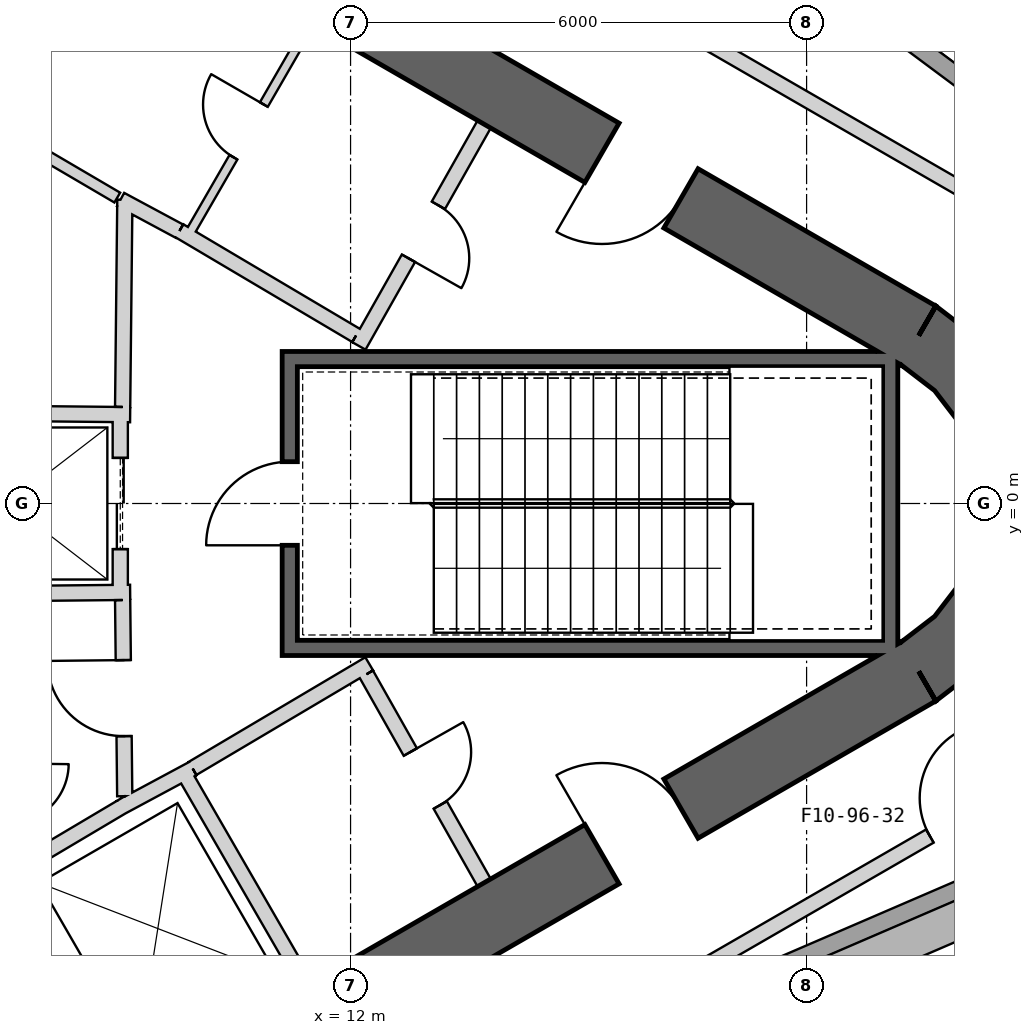
"""IFC4 building model, lengths in metres.
Left out: names, types, materials, properties, quantities, classifications, styles, units other than length and angle.
Written with IfcOpenShell. Run it as: python <this file> out.ifc"""

import sys

from ifc_helpers import new_model, si_unit, direction, frame, frame_2d, origin, place, context, subcontext, project, spatial, polyline, rectangle, outline, extrude, element, fill, save


model = new_model("IFC4")
c1 = context("Model", 3, precision=1e-05, world=origin(), true_north=direction((0.0, 1.0)))
c2 = subcontext(c1, "Body", "Model", "MODEL_VIEW")
j1 = project(units=[si_unit("LENGTHUNIT", "METRE"), si_unit("PLANEANGLEUNIT", "RADIAN")], contexts=[c1])
p1 = place(None, origin())
s1 = spatial("IfcSite", under=j1, at=p1, CompositionType="ELEMENT")
p2 = place(p1, origin())
s2 = spatial("IfcBuilding", under=s1, at=p2, CompositionType="ELEMENT")
p3 = place(p2, frame((0.0, 0.0, 425.3)))
s3 = spatial("IfcBuildingStorey", under=s2, at=p3, CompositionType="ELEMENT", Elevation=425.3)
p4 = place(p3, frame((19.475, 2.208, 0.0), z_axis=(0.0, 0.0, 1.0), x_axis=(-0.866028369851, 0.499994862586, 0.0)))
e1 = element("IfcWall", 1, at=p4, inside=s3, PredefinedType="SHEAR", context=c2, shape_type="SweptSolid", body=[
    extrude(rectangle(XDim=31.523, YDim=0.9, at=frame_2d((15.762, 0.0))), origin(), (0.0, 0.0, 1.0), 5.0),
])
p5 = place(p4, frame((3.612, 0.0, 0.0)))
e2 = element("IfcOpeningElement", 2, at=p5, cuts=e1, PredefinedType="OPENING", context=c2, shape_type="SweptSolid", body=[
    extrude(rectangle(XDim=1.2, YDim=2.4, at=frame_2d((0.6, 1.2))), frame((0.0, 0.46, 0.0), z_axis=(0.0, -1.0, 0.0), x_axis=(1.0, 0.0, 0.0)), (0.0, 0.0, 1.0), 0.92),
])
p6 = place(p4, frame((26.712, 0.0, 0.0)))
e3 = element("IfcOpeningElement", 3, at=p6, cuts=e1, PredefinedType="OPENING", context=c2, shape_type="SweptSolid", body=[
    extrude(rectangle(XDim=1.2, YDim=2.4, at=frame_2d((0.6, 1.2))), frame((0.0, 0.46, 0.0), z_axis=(0.0, -1.0, 0.0), x_axis=(1.0, 0.0, 0.0)), (0.0, 0.0, 1.0), 0.92),
])
p7 = place(p3, frame((-7.825, -17.97, 0.0), z_axis=(0.0, 0.0, 1.0), x_axis=(0.866028369851, 0.499994862586, 0.0)))
e4 = element("IfcWall", 4, at=p7, inside=s3, PredefinedType="SHEAR", context=c2, shape_type="SweptSolid", body=[
    extrude(rectangle(XDim=31.523, YDim=0.9, at=frame_2d((15.762, 0.0))), origin(), (0.0, 0.0, 1.0), 5.0),
])
p8 = place(p7, frame((17.862, 0.0, 0.0)))
e5 = element("IfcOpeningElement", 5, at=p8, cuts=e4, PredefinedType="OPENING", context=c2, shape_type="SweptSolid", body=[
    extrude(rectangle(XDim=1.2, YDim=2.4, at=frame_2d((0.6, 1.2))), frame((0.0, 0.46, 0.0), z_axis=(0.0, -1.0, 0.0), x_axis=(1.0, 0.0, 0.0)), (0.0, 0.0, 1.0), 0.92),
])
p9 = place(p7, frame((20.562, 0.0, 0.0)))
e6 = element("IfcOpeningElement", 6, at=p9, cuts=e4, PredefinedType="OPENING", context=c2, shape_type="SweptSolid", body=[
    extrude(rectangle(XDim=1.2, YDim=2.4, at=frame_2d((0.6, 1.2))), frame((0.0, 0.46, 0.0), z_axis=(0.0, -1.0, 0.0), x_axis=(1.0, 0.0, 0.0)), (0.0, 0.0, 1.0), 0.92),
])
p10 = place(p7, frame((26.712, 0.0, 0.0)))
e7 = element("IfcOpeningElement", 7, at=p10, cuts=e4, PredefinedType="OPENING", context=c2, shape_type="SweptSolid", body=[
    extrude(rectangle(XDim=1.2, YDim=2.4, at=frame_2d((0.6, 1.2))), frame((0.0, 0.46, 0.0), z_axis=(0.0, -1.0, 0.0), x_axis=(1.0, 0.0, 0.0)), (0.0, 0.0, 1.0), 0.92),
])
p11 = place(p7, frame((3.612, 0.0, 0.0)))
e8 = element("IfcOpeningElement", 8, at=p11, cuts=e4, PredefinedType="OPENING", context=c2, shape_type="SweptSolid", body=[
    extrude(rectangle(XDim=1.2, YDim=2.4, at=frame_2d((0.6, 1.2))), frame((0.0, 0.46, 0.0), z_axis=(0.0, -1.0, 0.0), x_axis=(1.0, 0.0, 0.0)), (0.0, 0.0, 1.0), 0.92),
])
p12 = place(p3, origin())
e9 = element("IfcWall", 9, at=p12, inside=s3, PredefinedType="SHEAR", context=c2, shape_type="SweptSolid", body=[
    extrude(outline(polyline([(19.7, -2.598), (20.321, -2.121), (20.798, -1.5), (21.098, -0.777), (21.2, 0.0), (21.098, 0.777), (20.798, 1.5), (20.321, 2.121), (19.7, 2.598), (19.25, 1.819), (19.685, 1.485), (20.019, 1.05), (20.229, 0.543), (20.3, 0.0), (20.229, -0.543), (20.019, -1.05), (19.685, -1.485), (19.25, -1.819), (19.7, -2.598)])), origin(), (0.0, 0.0, 1.0), 5.0),
])
p13 = place(p3, frame((21.654, 4.375, 0.0), z_axis=(0.0, 0.0, 1.0), x_axis=(-0.802005747834, 0.597316315231, 0.0)))
e10 = element("IfcWall", 10, at=p13, inside=s3, PredefinedType="SOLIDWALL", context=c2, shape_type="SweptSolid", body=[
    extrude(rectangle(XDim=6.66, YDim=0.24, at=frame_2d((3.33, 0.0))), origin(), (0.0, 0.0, 1.0), 4.75),
])
p14 = place(p3, frame((15.54, -7.005, 0.0), z_axis=(0.0, 0.0, 1.0), x_axis=(0.918309861651, 0.395862347281, 0.0)))
e11 = element("IfcWall", 11, at=p14, inside=s3, PredefinedType="SOLIDWALL", context=c2, shape_type="SweptSolid", body=[
    extrude(rectangle(XDim=6.669, YDim=0.24, at=frame_2d((3.335, 0.0))), origin(), (0.0, 0.0, 1.0), 4.75),
])
p15 = place(p3, frame((23.637, -4.509, 0.04), z_axis=(0.0, 0.0, 1.0), x_axis=(-0.918296120804, -0.395894221372, 0.0)))
e12 = element("IfcWall", 12, at=p15, inside=s3, PredefinedType="PARAPET", context=c2, shape_type="SweptSolid", body=[
    extrude(rectangle(XDim=7.277, YDim=0.25, at=frame_2d((3.639, 0.0))), origin(), (0.0, 0.0, 1.0), 1.2),
])
p16 = place(p3, frame((17.792, 8.88, 0.04), z_axis=(0.0, 0.0, 1.0), x_axis=(0.801990625962, -0.597336618557, 0.0)))
e13 = element("IfcWall", 13, at=p16, inside=s3, PredefinedType="PARAPET", context=c2, shape_type="SweptSolid", body=[
    extrude(rectangle(XDim=7.254, YDim=0.25, at=frame_2d((3.627, 0.0))), origin(), (0.0, 0.0, 1.0), 1.2),
])
p17 = place(p3, frame((22.794, -4.273, 0.04), z_axis=(0.0, 0.0, 1.0), x_axis=(-0.918301368911, -0.395882047908, 0.0)))
e14 = element("IfcWall", 14, at=p17, inside=s3, PredefinedType="PARAPET", context=c2, shape_type="SweptSolid", body=[
    extrude(rectangle(XDim=6.062, YDim=0.5, at=frame_2d((3.031, 0.0))), origin(), (0.0, 0.0, 1.0), 0.6),
])
p18 = place(p3, frame((17.978, 8.056, 0.04), z_axis=(0.0, 0.0, 1.0), x_axis=(0.801984037466, -0.597345464242, 0.0)))
e15 = element("IfcWall", 15, at=p18, inside=s3, PredefinedType="PARAPET", context=c2, shape_type="SweptSolid", body=[
    extrude(rectangle(XDim=5.982, YDim=0.5, at=frame_2d((2.991, 0.0))), origin(), (0.0, 0.0, 1.0), 0.6),
])
p19 = place(p3, frame((9.795, -3.525, 0.0), z_axis=(0.0, 0.0, 1.0), x_axis=(0.499984717929, -0.866034226713, 0.0)))
e16 = element("IfcWall", 16, at=p19, inside=s3, PredefinedType="PLUMBINGWALL", context=c2, shape_type="SweptSolid", body=[
    extrude(rectangle(XDim=3.25, YDim=0.2, at=frame_2d((1.625, 0.0))), origin(), (0.0, 0.0, 1.0), 4.75),
])
p20 = place(p3, frame((8.974, -3.999, 0.0), z_axis=(0.0, 0.0, 1.0), x_axis=(0.880907015104, 0.473289373154, 0.0)))
e17 = element("IfcWall", 17, at=p20, inside=s3, PredefinedType="PLUMBINGWALL", context=c2, shape_type="SweptSolid", body=[
    extrude(rectangle(XDim=1.078, YDim=0.2, at=frame_2d((0.539, 0.0))), origin(), (0.0, 0.0, 1.0), 4.75),
])
p21 = place(p3, frame((7.493, -4.878, 0.0), z_axis=(0.0, 0.0, 1.0), x_axis=(0.859981807212, 0.510324691999, 0.0)))
e18 = element("IfcWall", 18, at=p21, inside=s3, PredefinedType="PLUMBINGWALL", context=c2, shape_type="SweptSolid", body=[
    extrude(rectangle(XDim=1.845, YDim=0.2, at=frame_2d((0.922, 0.0))), origin(), (0.0, 0.0, 1.0), 4.75),
])
p22 = place(p3, frame((19.2, 1.9, -0.25), z_axis=(0.0, 0.0, 1.0), x_axis=(-1.0, 0.0, 0.0)))
e19 = element("IfcWall", 19, at=p22, inside=s3, PredefinedType="SHEAR", context=c2, shape_type="SweptSolid", body=[
    extrude(rectangle(XDim=8.1, YDim=0.2, at=frame_2d((4.05, 0.0))), origin(), (0.0, 0.0, 1.0), 5.0),
])
p23 = place(p3, frame((19.1, -2.0, -0.25), z_axis=(0.0, 0.0, 1.0), x_axis=(0.0, 1.0, 0.0)))
e20 = element("IfcWall", 20, at=p23, inside=s3, PredefinedType="SHEAR", context=c2, shape_type="SweptSolid", body=[
    extrude(rectangle(XDim=3.8, YDim=0.2, at=frame_2d((1.9, 0.0))), origin(), (0.0, 0.0, 1.0), 5.0),
])
p24 = place(p3, frame((11.1, -1.9, -0.25), z_axis=(0.0, 0.0, 1.0), x_axis=(1.0, 0.0, 0.0)))
e21 = element("IfcWall", 21, at=p24, inside=s3, PredefinedType="SHEAR", context=c2, shape_type="SweptSolid", body=[
    extrude(rectangle(XDim=7.9, YDim=0.2, at=frame_2d((3.95, 0.0))), origin(), (0.0, 0.0, 1.0), 5.0),
])
p25 = place(p3, frame((11.2, -1.8, -0.25), z_axis=(0.0, 0.0, 1.0), x_axis=(0.0, 1.0, 0.0)))
e22 = element("IfcWall", 22, at=p25, inside=s3, PredefinedType="SHEAR", context=c2, shape_type="SweptSolid", body=[
    extrude(rectangle(XDim=3.6, YDim=0.2, at=frame_2d((1.8, 0.0))), origin(), (0.0, 0.0, 1.0), 5.0),
])
p26 = place(p25, frame((1.25, 0.0, 0.25)))
e23 = element("IfcOpeningElement", 23, at=p26, cuts=e22, PredefinedType="OPENING", context=c2, shape_type="SweptSolid", body=[
    extrude(rectangle(XDim=1.1, YDim=2.1, at=frame_2d((0.55, 1.05))), frame((0.0, 0.11, 0.0), z_axis=(0.0, -1.0, 0.0), x_axis=(1.0, 0.0, 0.0)), (0.0, 0.0, 1.0), 0.22),
])
p27 = place(p3, frame((8.97, 1.2, 0.0), z_axis=(0.0, 0.0, 1.0), x_axis=(0.0, -1.0, 0.0)))
e24 = element("IfcWall", 24, at=p27, inside=s3, PredefinedType="PLUMBINGWALL", context=c2, shape_type="SweptSolid", body=[
    extrude(rectangle(XDim=2.4, YDim=0.2, at=frame_2d((1.2, 0.0))), origin(), (0.0, 0.0, 1.0), 4.75),
])
p28 = place(p27, frame((0.6, 0.0, 0.0)))
e25 = element("IfcOpeningElement", 25, at=p28, cuts=e24, PredefinedType="OPENING", context=c2, shape_type="SweptSolid", body=[
    extrude(rectangle(XDim=1.2, YDim=2.4, at=frame_2d((0.6, 1.2))), frame((0.0, 0.11, 0.0), z_axis=(0.0, -1.0, 0.0), x_axis=(1.0, 0.0, 0.0)), (0.0, 0.0, 1.0), 0.22),
])
for number, where, z_axis, x_axis in (
    (26, (5.9, 1.201, 0.0), (0.0, 0.0, 1.0), (1.0, -0.01, 0.0)),
    (27, (5.9, -1.201, 0.0), (0.0, 0.0, 1.0), (1.0, 0.01, 0.0)),
):
    element("IfcWall", number, at=place(p3, frame(where, z_axis=z_axis, x_axis=x_axis)), inside=s3, PredefinedType="PLUMBINGWALL", context=c2, shape_type="SweptSolid", body=[
        extrude(rectangle(XDim=3.2, YDim=0.2, at=frame_2d((1.6, 0.0))), origin(), (0.0, 0.0, 1.0), 4.75),
    ])
p29 = place(p3, frame((9.847, 3.495, 0.0), z_axis=(0.0, 0.0, 1.0), x_axis=(0.499984717929, 0.866034226713, 0.0)))
e28 = element("IfcWall", 28, at=p29, inside=s3, PredefinedType="PARTITIONING", context=c2, shape_type="SweptSolid", body=[
    extrude(rectangle(XDim=3.25, YDim=0.12, at=frame_2d((1.625, 0.0))), origin(), (0.0, 0.0, 1.0), 4.75),
])
p30 = place(p29, frame((1.225, 0.0, 0.0)))
e29 = element("IfcOpeningElement", 29, at=p30, cuts=e28, PredefinedType="OPENING", context=c2, shape_type="SweptSolid", body=[
    extrude(rectangle(XDim=0.8, YDim=2.1, at=frame_2d((0.4, 1.05))), frame((0.0, 0.07, 0.0), z_axis=(0.0, -1.0, 0.0), x_axis=(1.0, 0.0, 0.0)), (0.0, 0.0, 1.0), 0.14),
])
p31 = place(p3, frame((12.11, 2.073, 0.0), z_axis=(0.0, 0.0, 1.0), x_axis=(0.49196600604, 0.870614408852, 0.0)))
e30 = element("IfcWall", 30, at=p31, inside=s3, PredefinedType="PARTITIONING", context=c2, shape_type="SweptSolid", body=[
    extrude(rectangle(XDim=3.35, YDim=0.2, at=frame_2d((1.675, 0.0))), origin(), (0.0, 0.0, 1.0), 4.75),
])
p32 = place(p31, frame((1.325, 0.0, 0.0)))
e31 = element("IfcOpeningElement", 31, at=p32, cuts=e30, PredefinedType="OPENING", context=c2, shape_type="SweptSolid", body=[
    extrude(rectangle(XDim=0.8, YDim=2.1, at=frame_2d((0.4, 1.05))), frame((0.0, 0.11, 0.0), z_axis=(0.0, -1.0, 0.0), x_axis=(1.0, 0.0, 0.0)), (0.0, 0.0, 1.0), 0.22),
])
p33 = place(p3, frame((9.75, 3.587, 0.0), z_axis=(0.0, 0.0, 1.0), x_axis=(0.860414880418, -0.509594185166, 0.0)))
e32 = element("IfcWall", 32, at=p33, inside=s3, PredefinedType="PARTITIONING", context=c2, shape_type="SweptSolid", body=[
    extrude(rectangle(XDim=2.7, YDim=0.2, at=frame_2d((1.35, 0.0))), origin(), (0.0, 0.0, 1.0), 4.75),
])
p34 = place(p3, frame((8.974, 3.999, 0.0), z_axis=(0.0, 0.0, 1.0), x_axis=(0.880917147855, -0.473270513147, 0.0)))
e33 = element("IfcWall", 33, at=p34, inside=s3, PredefinedType="PARTITIONING", context=c2, shape_type="SweptSolid", body=[
    extrude(rectangle(XDim=0.878, YDim=0.2, at=frame_2d((0.439, 0.0))), origin(), (0.0, 0.0, 1.0), 4.75),
])
p35 = place(p3, frame((8.931, 4.025, 0.0), z_axis=(0.0, 0.0, 1.0), x_axis=(-0.862666884027, 0.505772525157, 0.0)))
e34 = element("IfcWall", 34, at=p35, inside=s3, PredefinedType="PLUMBINGWALL", context=c2, shape_type="SweptSolid", body=[
    extrude(rectangle(XDim=4.372, YDim=0.15, at=frame_2d((2.186, 0.0))), origin(), (0.0, 0.0, 1.0), 4.75),
])
p36 = place(p3, frame((12.245, -2.109, 0.0), z_axis=(0.0, 0.0, 1.0), x_axis=(-0.860414880418, -0.509594185166, 0.0)))
e35 = element("IfcWall", 35, at=p36, inside=s3, PredefinedType="PARTITIONING", context=c2, shape_type="SweptSolid", body=[
    extrude(rectangle(XDim=2.7, YDim=0.2, at=frame_2d((1.35, 0.0))), origin(), (0.0, 0.0, 1.0), 4.75),
])
p37 = place(p3, frame((13.758, -4.99, 0.0), z_axis=(0.0, 0.0, 1.0), x_axis=(-0.491993409184, 0.87059892334, 0.0)))
e36 = element("IfcWall", 36, at=p37, inside=s3, PredefinedType="PARTITIONING", context=c2, shape_type="SweptSolid", body=[
    extrude(rectangle(XDim=3.15, YDim=0.2, at=frame_2d((1.575, 0.0))), origin(), (0.0, 0.0, 1.0), 4.75),
])
p38 = place(p37, frame((1.175, 0.0, 0.0)))
e37 = element("IfcOpeningElement", 37, at=p38, cuts=e36, PredefinedType="OPENING", context=c2, shape_type="SweptSolid", body=[
    extrude(rectangle(XDim=0.8, YDim=2.1, at=frame_2d((0.4, 1.05))), frame((0.0, 0.11, 0.0), z_axis=(0.0, -1.0, 0.0), x_axis=(1.0, 0.0, 0.0)), (0.0, 0.0, 1.0), 0.22),
])
p39 = place(p3, frame((9.001, 1.27, 0.0), z_axis=(0.0, 0.0, 1.0), x_axis=(0.01074821465, 0.999942236273, 0.0)))
e38 = element("IfcWall", 38, at=p39, inside=s3, PredefinedType="PARTITIONING", context=c2, shape_type="SweptSolid", body=[
    extrude(rectangle(XDim=2.726, YDim=0.2, at=frame_2d((1.363, 0.0))), origin(), (0.0, 0.0, 1.0), 4.75),
])
p40 = place(p3, frame((9.029, -3.851, 0.0), z_axis=(0.0, 0.0, 1.0), x_axis=(-0.010783593937, 0.99994185536, 0.0)))
e39 = element("IfcWall", 39, at=p40, inside=s3, PredefinedType="PARTITIONING", context=c2, shape_type="SweptSolid", body=[
    extrude(rectangle(XDim=2.581, YDim=0.2, at=frame_2d((1.291, 0.0))), origin(), (0.0, 0.0, 1.0), 4.75),
])
p41 = place(p40, frame((0.791, 0.0, 0.0)))
e40 = element("IfcOpeningElement", 40, at=p41, cuts=e39, PredefinedType="OPENING", context=c2, shape_type="SweptSolid", body=[
    extrude(rectangle(XDim=1.0, YDim=2.1, at=frame_2d((0.5, 1.05))), frame((0.0, 0.11, 0.0), z_axis=(0.0, -1.0, 0.0), x_axis=(1.0, 0.0, 0.0)), (0.0, 0.0, 1.0), 0.22),
])
p42 = place(p3, frame((20.834, 3.675, 0.0), z_axis=(0.0, 0.0, 1.0), x_axis=(-0.866033490305, 0.499985993474, 0.0)))
e41 = element("IfcWall", 41, at=p42, inside=s3, PredefinedType="PARTITIONING", context=c2, shape_type="SweptSolid", body=[
    extrude(rectangle(XDim=12.75, YDim=0.2, at=frame_2d((6.375, 0.0))), origin(), (0.0, 0.0, 1.0), 4.75),
])
p43 = place(p42, frame((5.9, 0.0, 0.0)))
e42 = element("IfcOpeningElement", 42, at=p43, cuts=e41, PredefinedType="OPENING", context=c2, shape_type="SweptSolid", body=[
    extrude(rectangle(XDim=1.0, YDim=2.1, at=frame_2d((0.5, 1.05))), frame((0.0, 0.11, 0.0), z_axis=(0.0, -1.0, 0.0), x_axis=(1.0, 0.0, 0.0)), (0.0, 0.0, 1.0), 0.22),
])
p44 = place(p3, frame((9.566, -10.181, 0.0), z_axis=(0.0, 0.0, 1.0), x_axis=(0.866019300368, 0.500010571279, 0.0)))
e43 = element("IfcWall", 43, at=p44, inside=s3, PredefinedType="PARTITIONING", context=c2, shape_type="SweptSolid", body=[
    extrude(rectangle(XDim=12.812, YDim=0.2, at=frame_2d((6.406, 0.0))), origin(), (0.0, 0.0, 1.0), 4.75),
])
p45 = place(p44, frame((11.612, 0.0, 0.0)))
e44 = element("IfcOpeningElement", 44, at=p45, cuts=e43, PredefinedType="OPENING", context=c2, shape_type="SweptSolid", body=[
    extrude(rectangle(XDim=1.0, YDim=2.1, at=frame_2d((0.5, 1.05))), frame((0.0, 0.11, 0.0), z_axis=(0.0, -1.0, 0.0), x_axis=(1.0, 0.0, 0.0)), (0.0, 0.0, 1.0), 0.22),
])
p46 = place(p26, origin())
e45 = element("IfcDoor", 45, at=p46, inside=s3, OperationType="SINGLE_SWING_LEFT", PredefinedType="USERDEFINED", context=c2, shape_type="SweptSolid", body=[
    extrude(rectangle(XDim=1.1, YDim=2.1, at=frame_2d((0.55, 1.05))), frame((0.0, 0.025, 0.0), z_axis=(0.0, -1.0, 0.0), x_axis=(1.0, 0.0, 0.0)), (0.0, 0.0, 1.0), 0.05),
])
fill(e23, e45)
p47 = place(p41, origin())
e46 = element("IfcDoor", 46, at=p47, inside=s3, OperationType="SINGLE_SWING_RIGHT", PredefinedType="USERDEFINED", context=c2, shape_type="SweptSolid", body=[
    extrude(rectangle(XDim=1.0, YDim=2.1, at=frame_2d((0.5, 1.05))), frame((0.0, 0.025, 0.0), z_axis=(0.0, -1.0, 0.0), x_axis=(1.0, 0.0, 0.0)), (0.0, 0.0, 1.0), 0.05),
])
fill(e40, e46)
p48 = place(p28, origin())
e47 = element("IfcDoor", 47, at=p48, inside=s3, OperationType="SLIDING_TO_LEFT", PredefinedType="USERDEFINED", context=c2, shape_type="SweptSolid", body=[
    extrude(rectangle(XDim=1.2, YDim=2.4, at=frame_2d((0.6, 1.2))), frame((0.0, 0.025, 0.0), z_axis=(0.0, -1.0, 0.0), x_axis=(1.0, 0.0, 0.0)), (0.0, 0.0, 1.0), 0.05),
])
fill(e25, e47)
p49 = place(p32, origin())
e48 = element("IfcDoor", 48, at=p49, inside=s3, OperationType="SINGLE_SWING_LEFT", PredefinedType="USERDEFINED", context=c2, shape_type="SweptSolid", body=[
    extrude(rectangle(XDim=0.8, YDim=2.1, at=frame_2d((0.4, 1.05))), frame((0.0, 0.025, 0.0), z_axis=(0.0, -1.0, 0.0), x_axis=(1.0, 0.0, 0.0)), (0.0, 0.0, 1.0), 0.05),
])
fill(e31, e48)
p50 = place(p38, origin())
e49 = element("IfcDoor", 49, at=p50, inside=s3, OperationType="SINGLE_SWING_RIGHT", PredefinedType="USERDEFINED", context=c2, shape_type="SweptSolid", body=[
    extrude(rectangle(XDim=0.8, YDim=2.1, at=frame_2d((0.4, 1.05))), frame((0.0, 0.025, 0.0), z_axis=(0.0, -1.0, 0.0), x_axis=(1.0, 0.0, 0.0)), (0.0, 0.0, 1.0), 0.05),
])
fill(e37, e49)
p51 = place(p45, origin())
e50 = element("IfcDoor", 50, at=p51, inside=s3, OperationType="SINGLE_SWING_RIGHT", PredefinedType="USERDEFINED", context=c2, shape_type="SweptSolid", body=[
    extrude(rectangle(XDim=1.0, YDim=2.1, at=frame_2d((0.5, 1.05))), frame((0.0, 0.025, 0.0), z_axis=(0.0, -1.0, 0.0), x_axis=(1.0, 0.0, 0.0)), (0.0, 0.0, 1.0), 0.05),
])
fill(e44, e50)
p52 = place(p30, origin())
e51 = element("IfcDoor", 51, at=p52, inside=s3, OperationType="SINGLE_SWING_RIGHT", PredefinedType="USERDEFINED", context=c2, shape_type="SweptSolid", body=[
    extrude(rectangle(XDim=0.8, YDim=2.1, at=frame_2d((0.4, 1.05))), frame((0.0, 0.025, 0.0), z_axis=(0.0, -1.0, 0.0), x_axis=(1.0, 0.0, 0.0)), (0.0, 0.0, 1.0), 0.05),
])
fill(e29, e51)
p53 = place(p10, origin())
e52 = element("IfcDoor", 52, at=p53, inside=s3, OperationType="SINGLE_SWING_LEFT", PredefinedType="USERDEFINED", context=c2, shape_type="SweptSolid", body=[
    extrude(rectangle(XDim=1.2, YDim=2.4, at=frame_2d((0.6, 1.2))), frame((0.0, 0.025, 0.0), z_axis=(0.0, -1.0, 0.0), x_axis=(1.0, 0.0, 0.0)), (0.0, 0.0, 1.0), 0.05),
])
fill(e7, e52)
p54 = place(p5, origin())
e53 = element("IfcDoor", 53, at=p54, inside=s3, OperationType="SINGLE_SWING_RIGHT", PredefinedType="USERDEFINED", context=c2, shape_type="SweptSolid", body=[
    extrude(rectangle(XDim=1.2, YDim=2.4, at=frame_2d((0.6, 1.2))), frame((0.0, 0.025, 0.0), z_axis=(0.0, -1.0, 0.0), x_axis=(1.0, 0.0, 0.0)), (0.0, 0.0, 1.0), 0.05),
])
fill(e2, e53)
save(model, sys.argv[1])
